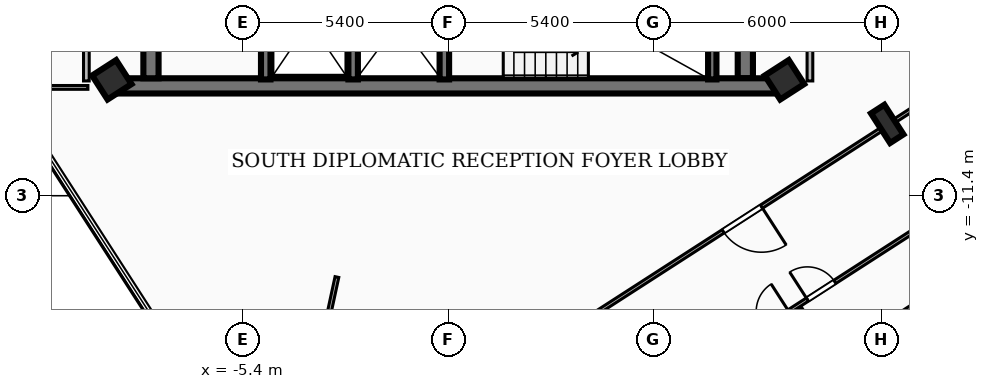
"""IFC4 building model, lengths in metres.
Left out: names, types, materials, properties, quantities, classifications, styles, units other than length and angle.
Written with IfcOpenShell. Run it as: python <this file> out.ifc"""

import sys

from ifc_helpers import new_model, si_unit, direction, frame, frame_2d, origin, origin_2d, place, context, subcontext, project, spatial, rectangle, i_section, extrude, element, fill, save


model = new_model("IFC4")
c1 = context("Model", 3, precision=1e-05, world=origin(), true_north=direction((0.0, 1.0)))
c2 = subcontext(c1, "Body", "Model", "MODEL_VIEW")
j1 = project(units=[si_unit("LENGTHUNIT", "METRE"), si_unit("PLANEANGLEUNIT", "RADIAN")], contexts=[c1])
p1 = place(None, origin())
s1 = spatial("IfcSite", under=j1, at=p1, CompositionType="ELEMENT")
p2 = place(p1, origin())
s2 = spatial("IfcBuilding", under=s1, at=p2, CompositionType="ELEMENT")
p3 = place(p2, frame((0.0, 0.0, 215.46)))
s3 = spatial("IfcBuildingStorey", under=s2, at=p3, CompositionType="ELEMENT", Elevation=215.46)
p4 = place(p3, frame((8.78, -8.51, 0.0), z_axis=(0.0, 0.0, 1.0), x_axis=(-1.0, 0.0, 0.0)))
e1 = element("IfcWall", 1, at=p4, inside=s3, PredefinedType="SHEAR", context=c2, shape_type="SweptSolid", body=[
    extrude(rectangle(XDim=17.56, YDim=0.4, at=frame_2d((8.78, 0.0))), origin(), (0.0, 0.0, 1.0), 3.16),
])
for number, where, z_axis, x_axis in (
    (2, (-7.82, -8.31, 0.0), (0.0, 0.0, 1.0), (0.0, 1.0, 0.0)),
    (3, (7.82, -1.95, 0.0), (0.0, 0.0, 1.0), (0.0, -1.0, 0.0)),
):
    element("IfcWall", number, at=place(p3, frame(where, z_axis=z_axis, x_axis=x_axis)), inside=s3, PredefinedType="SHEAR", context=c2, shape_type="SweptSolid", body=[
        extrude(rectangle(XDim=6.36, YDim=0.4, at=frame_2d((3.18, 0.0))), origin(), (0.0, 0.0, 1.0), 3.16),
    ])
p5 = place(p3, frame((6.95, -8.34, 0.0), z_axis=(0.0, 0.0, 1.0), x_axis=(0.0, 1.0, 0.0)))
e4 = element("IfcWall", 4, at=p5, inside=s3, PredefinedType="SOLIDWALL", context=c2, shape_type="SweptSolid", body=[
    extrude(rectangle(XDim=3.06, YDim=0.22, at=frame_2d((1.53, 0.0))), origin(), (0.0, 0.0, 1.0), 3.16),
])
for number, where, z_axis, x_axis in (
    (5, (-0.1, -8.34, 0.0), (0.0, 0.0, 1.0), (0.0, 1.0, 0.0)),
    (6, (-2.5, -8.34, 0.0), (0.0, 0.0, 1.0), (0.0, 1.0, 0.0)),
    (7, (-4.8, -8.34, 0.0), (0.0, 0.0, 1.0), (0.0, 1.0, 0.0)),
):
    element("IfcWall", number, at=place(p3, frame(where, z_axis=z_axis, x_axis=x_axis)), inside=s3, PredefinedType="SOLIDWALL", context=c2, shape_type="SweptSolid", body=[
        extrude(rectangle(XDim=3.04, YDim=0.25, at=frame_2d((1.52, 0.0))), origin(), (0.0, 0.0, 1.0), 3.16),
    ])
for number, where, z_axis, x_axis in (
    (8, (8.85, -8.35, 0.0), (0.0, 0.0, 1.0), (0.841, 0.542, 0.0)),
    (9, (-8.85, -8.35, 0.0), (0.0, 0.0, 1.0), (0.841, 0.542, 0.0)),
):
    element("IfcColumn", number, at=place(p3, frame(where, z_axis=z_axis, x_axis=x_axis)), inside=s3, PredefinedType="COLUMN", context=c2, shape_type="SweptSolid", body=[
        extrude(rectangle(XDim=0.75, YDim=0.75, at=origin_2d()), origin(), (0.0, 0.0, 1.0), 3.42),
    ])
p6 = place(p3, frame((11.554, -9.51, 0.0), z_axis=(0.0, 0.0, 1.0), x_axis=(0.840566603496, 0.541708210283, 0.0)))
e10 = element("IfcColumn", 10, at=p6, inside=s3, PredefinedType="COLUMN", context=c2, shape_type="SweptSolid", body=[
    extrude(i_section(OverallWidth=0.418, OverallDepth=0.927, WebThickness=0.019, FlangeThickness=0.032, at=origin_2d()), origin(), (0.0, 0.0, 1.0), 3.42),
])
for number, where, z_axis, x_axis in (
    (11, (-9.52, -8.38, 0.0), (0.0, 0.0, 1.0), (0.0, 1.0, 0.0)),
    (12, (9.52, -8.38, 0.0), (0.0, 0.0, 1.0), (0.0, 1.0, 0.0)),
):
    element("IfcWall", number, at=place(p3, frame(where, z_axis=z_axis, x_axis=x_axis)), inside=s3, PredefinedType="PARTITIONING", context=c2, shape_type="SweptSolid", body=[
        extrude(rectangle(XDim=6.63, YDim=0.15, at=frame_2d((3.315, 0.0))), origin(), (0.0, 0.0, 1.0), 3.16),
    ])
p7 = place(p3, frame((-11.603, -8.55, 0.0), z_axis=(0.0, 0.0, 1.0), x_axis=(1.0, 0.0, 0.0)))
e13 = element("IfcWall", 13, at=p7, inside=s3, PredefinedType="PARTITIONING", context=c2, shape_type="SweptSolid", body=[
    extrude(rectangle(XDim=2.123, YDim=0.1, at=frame_2d((1.062, 0.0))), origin(), (0.0, 0.0, 1.0), 3.16),
])
p8 = place(p3, frame((-2.927, -13.54, 0.0), z_axis=(0.0, 0.0, 1.0), x_axis=(-0.21141803497, -0.977395730751, 0.0)))
e14 = element("IfcWall", 14, at=p8, inside=s3, PredefinedType="PARTITIONING", context=c2, shape_type="SweptSolid", body=[
    extrude(rectangle(XDim=5.842, YDim=0.1, at=frame_2d((2.921, 0.0))), origin(), (0.0, 0.0, 1.0), 3.16),
])
p9 = place(p3, frame((16.331, -6.476, 0.0), z_axis=(0.0, 0.0, 1.0), x_axis=(-0.840579457381, -0.541688264437, 0.0)))
e15 = element("IfcWall", 15, at=p9, inside=s3, PredefinedType="PARTITIONING", context=c2, shape_type="SweptSolid", body=[
    extrude(rectangle(XDim=20.238, YDim=0.1, at=frame_2d((10.119, 0.0))), origin(), (0.0, 0.0, 1.0), 2.53),
])
p10 = place(p9, frame((9.619, 0.0, 0.0)))
e16 = element("IfcOpeningElement", 16, at=p10, cuts=e15, PredefinedType="OPENING", context=c2, shape_type="SweptSolid", body=[
    extrude(rectangle(XDim=1.2, YDim=2.1, at=frame_2d((0.6, 1.05))), frame((0.0, 0.06, 0.0), z_axis=(0.0, -1.0, 0.0), x_axis=(1.0, 0.0, 0.0)), (0.0, 0.0, 1.0), 0.12),
])
p11 = place(p3, frame((9.242, -14.34, 0.0), z_axis=(0.0, 0.0, 1.0), x_axis=(0.541443159102, -0.840737358193, 0.0)))
e17 = element("IfcWall", 17, at=p11, inside=s3, PredefinedType="PARTITIONING", context=c2, shape_type="SweptSolid", body=[
    extrude(rectangle(XDim=1.53, YDim=0.1, at=frame_2d((0.765, 0.0))), origin(), (0.0, 0.0, 1.0), 3.16),
])
p12 = place(p3, frame((3.8, -17.775, 0.0), z_axis=(0.0, 0.0, 1.0), x_axis=(0.840588193286, 0.54167470802, 0.0)))
e18 = element("IfcWall", 18, at=p12, inside=s3, PredefinedType="PARTITIONING", context=c2, shape_type="SweptSolid", body=[
    extrude(rectangle(XDim=12.67, YDim=0.1, at=frame_2d((6.335, 0.0))), origin(), (0.0, 0.0, 1.0), 3.16),
])
p13 = place(p12, frame((5.285, 0.0, 0.0)))
e19 = element("IfcOpeningElement", 19, at=p13, cuts=e18, PredefinedType="OPENING", context=c2, shape_type="SweptSolid", body=[
    extrude(rectangle(XDim=0.86, YDim=2.04, at=frame_2d((0.43, 1.02))), frame((0.0, 0.06, 0.0), z_axis=(0.0, -1.0, 0.0), x_axis=(1.0, 0.0, 0.0)), (0.0, 0.0, 1.0), 0.12),
])
p14 = place(p12, frame((6.725, 0.0, 0.0)))
e20 = element("IfcOpeningElement", 20, at=p14, cuts=e18, PredefinedType="OPENING", context=c2, shape_type="SweptSolid", body=[
    extrude(rectangle(XDim=0.86, YDim=2.04, at=frame_2d((0.43, 1.02))), frame((0.0, 0.06, 0.0), z_axis=(0.0, -1.0, 0.0), x_axis=(1.0, 0.0, 0.0)), (0.0, 0.0, 1.0), 0.12),
])
p15 = place(p3, frame((15.344, -12.299, 0.0), z_axis=(0.0, 0.0, 1.0), x_axis=(-0.840579419228, -0.541688323642, 0.0)))
e21 = element("IfcWall", 21, at=p15, inside=s3, PredefinedType="PARTITIONING", context=c2, shape_type="SweptSolid", body=[
    extrude(rectangle(XDim=12.67, YDim=0.1, at=frame_2d((6.335, 0.0))), origin(), (0.0, 0.0, 1.0), 3.16),
])
p16 = place(p15, frame((4.96, 0.0, 0.0)))
e22 = element("IfcOpeningElement", 22, at=p16, cuts=e21, PredefinedType="OPENING", context=c2, shape_type="SweptSolid", body=[
    extrude(rectangle(XDim=1.3, YDim=2.1, at=frame_2d((0.65, 1.05))), frame((0.0, 0.06, 0.0), z_axis=(0.0, -1.0, 0.0), x_axis=(1.0, 0.0, 0.0)), (0.0, 0.0, 1.0), 0.12),
])
p17 = place(p10, origin())
e23 = element("IfcDoor", 23, at=p17, inside=s3, OperationType="SINGLE_SWING_LEFT", PredefinedType="DOOR", context=c2, shape_type="SweptSolid", body=[
    extrude(rectangle(XDim=1.2, YDim=2.1, at=frame_2d((0.6, 1.05))), frame((0.0, 0.025, 0.0), z_axis=(0.0, -1.0, 0.0), x_axis=(1.0, 0.0, 0.0)), (0.0, 0.0, 1.0), 0.05),
])
fill(e16, e23)
p18 = place(p14, origin())
e24 = element("IfcDoor", 24, at=p18, inside=s3, OperationType="SINGLE_SWING_LEFT", PredefinedType="DOOR", context=c2, shape_type="SweptSolid", body=[
    extrude(rectangle(XDim=0.86, YDim=2.04, at=frame_2d((0.43, 1.02))), frame((0.0, 0.025, 0.0), z_axis=(0.0, -1.0, 0.0), x_axis=(1.0, 0.0, 0.0)), (0.0, 0.0, 1.0), 0.05),
])
fill(e20, e24)
save(model, sys.argv[1])
